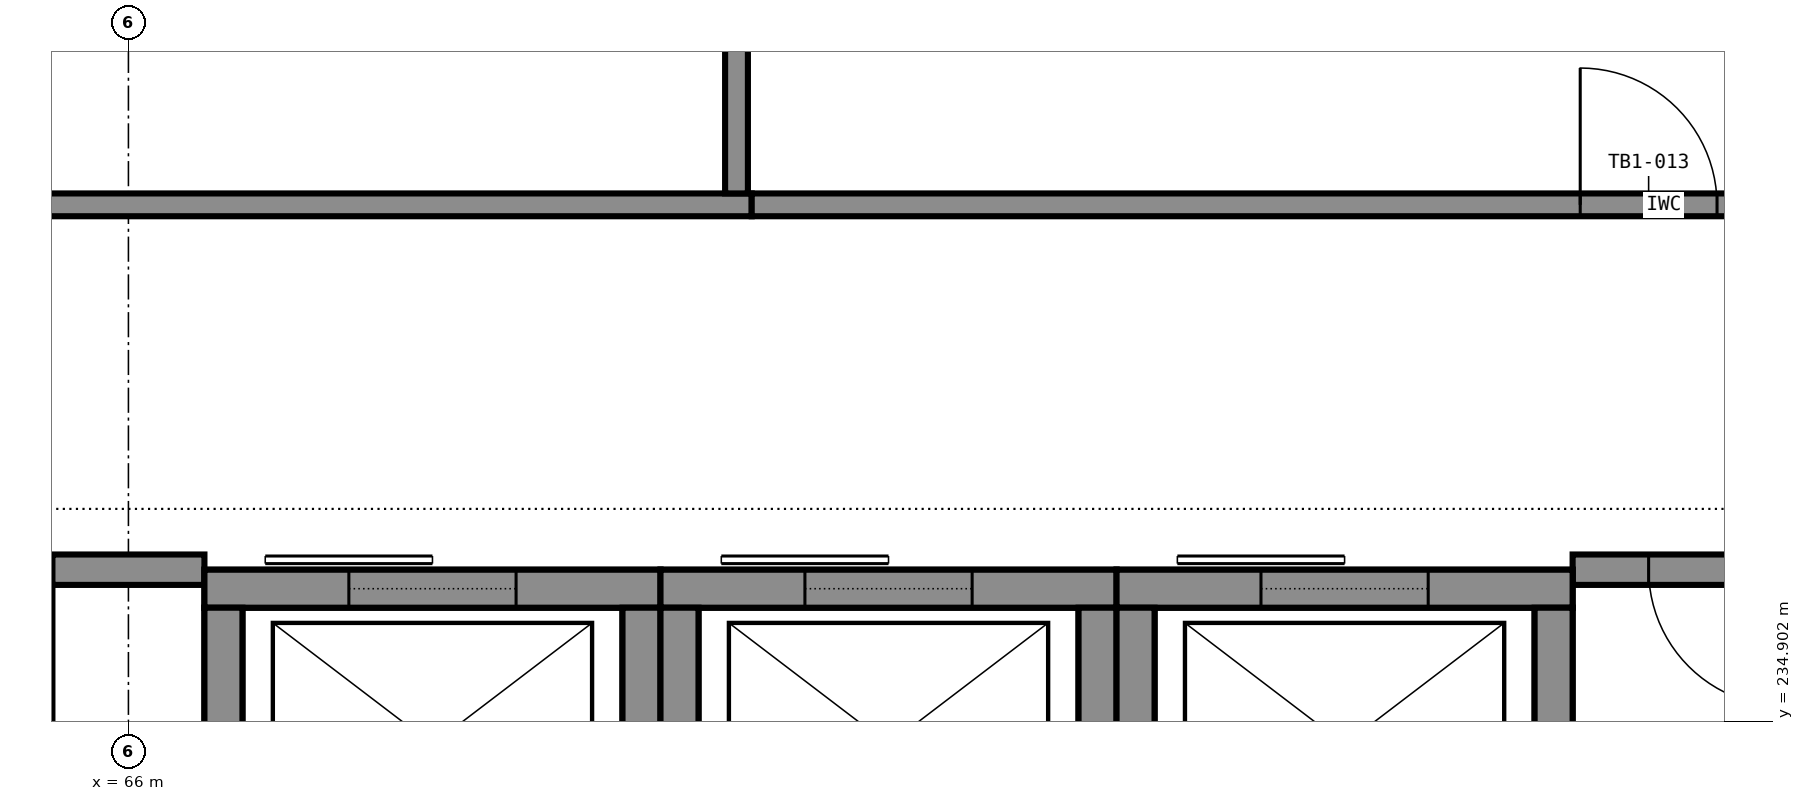
"""IFC4 building model, lengths in metres.
Left out: names, types, materials, properties, quantities, classifications, styles, units other than length and angle.
Written with IfcOpenShell. Run it as: python <this file> out.ifc"""

import sys

from ifc_helpers import new_model, si_unit, direction, frame, frame_2d, origin, place, context, subcontext, project, spatial, rectangle, extrude, element, fill, save


model = new_model("IFC4")
c1 = context("Model", 3, precision=1e-05, world=origin(), true_north=direction((0.0, 1.0)))
c2 = subcontext(c1, "Body", "Model", "MODEL_VIEW")
j1 = project(units=[si_unit("LENGTHUNIT", "METRE"), si_unit("PLANEANGLEUNIT", "RADIAN")], contexts=[c1])
p1 = place(None, origin())
s1 = spatial("IfcSite", under=j1, at=p1, CompositionType="ELEMENT")
p2 = place(p1, origin())
s2 = spatial("IfcBuilding", under=s1, at=p2, CompositionType="ELEMENT")
p3 = place(p2, frame((0.0, 0.0, -6.0)))
s3 = spatial("IfcBuildingStorey", under=s2, at=p3, CompositionType="ELEMENT", Elevation=-6.0)
p4 = place(p3, frame((66.5, 235.775, 0.0), z_axis=(0.0, 0.0, 1.0), x_axis=(1.0, 0.0, 0.0)))
e1 = element("IfcWall", 1, at=p4, inside=s3, PredefinedType="SHEAR", context=c2, shape_type="SweptSolid", body=[
    extrude(rectangle(XDim=3.0, YDim=0.25, at=frame_2d((1.5, 0.0))), origin(), (0.0, 0.0, 1.0), 6.0),
])
p5 = place(p4, frame((0.95, 0.0, 0.0)))
e2 = element("IfcOpeningElement", 2, at=p5, cuts=e1, PredefinedType="OPENING", context=c2, shape_type="SweptSolid", body=[
    extrude(rectangle(XDim=1.1, YDim=2.1, at=frame_2d((0.55, 1.05))), frame((0.0, 0.135, 0.0), z_axis=(0.0, -1.0, 0.0), x_axis=(1.0, 0.0, 0.0)), (0.0, 0.0, 1.0), 0.27),
])
for number, where, z_axis, x_axis in (
    (3, (66.625, 232.35, 0.0), (0.0, 0.0, 1.0), (0.0, 1.0, 0.0)),
    (4, (69.375, 232.35, 0.0), (0.0, 0.0, 1.0), (0.0, 1.0, 0.0)),
):
    element("IfcWall", number, at=place(p3, frame(where, z_axis=z_axis, x_axis=x_axis)), inside=s3, PredefinedType="SHEAR", context=c2, shape_type="SweptSolid", body=[
        extrude(rectangle(XDim=3.3, YDim=0.25, at=frame_2d((1.65, 0.0))), origin(), (0.0, 0.0, 1.0), 6.0),
    ])
p6 = place(p3, frame((69.5, 235.775, 0.0), z_axis=(0.0, 0.0, 1.0), x_axis=(1.0, 0.0, 0.0)))
e5 = element("IfcWall", 5, at=p6, inside=s3, PredefinedType="SHEAR", context=c2, shape_type="SweptSolid", body=[
    extrude(rectangle(XDim=3.0, YDim=0.25, at=frame_2d((1.5, 0.0))), origin(), (0.0, 0.0, 1.0), 6.0),
])
p7 = place(p6, frame((0.95, 0.0, 0.0)))
e6 = element("IfcOpeningElement", 6, at=p7, cuts=e5, PredefinedType="OPENING", context=c2, shape_type="SweptSolid", body=[
    extrude(rectangle(XDim=1.1, YDim=2.1, at=frame_2d((0.55, 1.05))), frame((0.0, 0.135, 0.0), z_axis=(0.0, -1.0, 0.0), x_axis=(1.0, 0.0, 0.0)), (0.0, 0.0, 1.0), 0.27),
])
for number, where, z_axis, x_axis in (
    (7, (69.625, 232.35, 0.0), (0.0, 0.0, 1.0), (0.0, 1.0, 0.0)),
    (8, (72.375, 232.35, 0.0), (0.0, 0.0, 1.0), (0.0, 1.0, 0.0)),
):
    element("IfcWall", number, at=place(p3, frame(where, z_axis=z_axis, x_axis=x_axis)), inside=s3, PredefinedType="SHEAR", context=c2, shape_type="SweptSolid", body=[
        extrude(rectangle(XDim=3.3, YDim=0.25, at=frame_2d((1.65, 0.0))), origin(), (0.0, 0.0, 1.0), 6.0),
    ])
p8 = place(p3, frame((72.5, 235.775, 0.0), z_axis=(0.0, 0.0, 1.0), x_axis=(1.0, 0.0, 0.0)))
e9 = element("IfcWall", 9, at=p8, inside=s3, PredefinedType="SHEAR", context=c2, shape_type="SweptSolid", body=[
    extrude(rectangle(XDim=3.0, YDim=0.25, at=frame_2d((1.5, 0.0))), origin(), (0.0, 0.0, 1.0), 6.0),
])
p9 = place(p8, frame((0.95, 0.0, 0.0)))
e10 = element("IfcOpeningElement", 10, at=p9, cuts=e9, PredefinedType="OPENING", context=c2, shape_type="SweptSolid", body=[
    extrude(rectangle(XDim=1.1, YDim=2.1, at=frame_2d((0.55, 1.05))), frame((0.0, 0.135, 0.0), z_axis=(0.0, -1.0, 0.0), x_axis=(1.0, 0.0, 0.0)), (0.0, 0.0, 1.0), 0.27),
])
for number, where, z_axis, x_axis in (
    (11, (72.625, 232.35, 0.0), (0.0, 0.0, 1.0), (0.0, 1.0, 0.0)),
    (12, (75.375, 232.35, 0.0), (0.0, 0.0, 1.0), (0.0, 1.0, 0.0)),
):
    element("IfcWall", number, at=place(p3, frame(where, z_axis=z_axis, x_axis=x_axis)), inside=s3, PredefinedType="SHEAR", context=c2, shape_type="SweptSolid", body=[
        extrude(rectangle(XDim=3.3, YDim=0.25, at=frame_2d((1.65, 0.0))), origin(), (0.0, 0.0, 1.0), 6.0),
    ])
p10 = place(p3, frame((65.5, 235.9, 0.0), z_axis=(0.0, 0.0, 1.0), x_axis=(1.0, 0.0, 0.0)))
e13 = element("IfcWall", 13, at=p10, inside=s3, PredefinedType="PARTITIONING", context=c2, shape_type="SweptSolid", body=[
    extrude(rectangle(XDim=1.0, YDim=0.2, at=frame_2d((0.5, 0.0))), origin(), (0.0, 0.0, 1.0), 5.7),
])
p11 = place(p3, frame((77.4, 235.9, 0.0), z_axis=(0.0, 0.0, 1.0), x_axis=(-1.0, 0.0, 0.0)))
e14 = element("IfcWall", 14, at=p11, inside=s3, PredefinedType="PARTITIONING", context=c2, shape_type="SweptSolid", body=[
    extrude(rectangle(XDim=1.9, YDim=0.2, at=frame_2d((0.95, 0.0))), origin(), (0.0, 0.0, 1.0), 5.7),
])
p12 = place(p11, frame((0.5, 0.0, 0.0)))
e15 = element("IfcOpeningElement", 15, at=p12, cuts=e14, PredefinedType="OPENING", context=c2, shape_type="SweptSolid", body=[
    extrude(rectangle(XDim=0.9, YDim=2.1, at=frame_2d((0.45, 1.05))), frame((0.0, 0.11, 0.0), z_axis=(0.0, -1.0, 0.0), x_axis=(1.0, 0.0, 0.0)), (0.0, 0.0, 1.0), 0.22),
])
p13 = place(p3, frame((58.1, 238.3, 0.0), z_axis=(0.0, 0.0, 1.0), x_axis=(1.0, 0.0, 0.0)))
e16 = element("IfcWall", 16, at=p13, inside=s3, PredefinedType="PARTITIONING", context=c2, shape_type="SweptSolid", body=[
    extrude(rectangle(XDim=12.0, YDim=0.15, at=frame_2d((6.0, 0.0))), origin(), (0.0, 0.0, 1.0), 5.7),
])
p14 = place(p13, frame((5.45, 0.0, 0.0)))
e17 = element("IfcOpeningElement", 17, at=p14, cuts=e16, PredefinedType="OPENING", context=c2, shape_type="SweptSolid", body=[
    extrude(rectangle(XDim=0.9, YDim=2.1, at=frame_2d((0.45, 1.05))), frame((0.0, 0.085, 0.0), z_axis=(0.0, -1.0, 0.0), x_axis=(1.0, 0.0, 0.0)), (0.0, 0.0, 1.0), 0.17),
])
p15 = place(p3, frame((70.1, 238.3, 0.0), z_axis=(0.0, 0.0, 1.0), x_axis=(1.0, 0.0, 0.0)))
e18 = element("IfcWall", 18, at=p15, inside=s3, PredefinedType="PARTITIONING", context=c2, shape_type="SweptSolid", body=[
    extrude(rectangle(XDim=12.0, YDim=0.15, at=frame_2d((6.0, 0.0))), origin(), (0.0, 0.0, 1.0), 5.7),
])
p16 = place(p15, frame((5.45, 0.0, 0.0)))
e19 = element("IfcOpeningElement", 19, at=p16, cuts=e18, PredefinedType="OPENING", context=c2, shape_type="SweptSolid", body=[
    extrude(rectangle(XDim=0.9, YDim=2.1, at=frame_2d((0.45, 1.05))), frame((0.0, 0.085, 0.0), z_axis=(0.0, -1.0, 0.0), x_axis=(1.0, 0.0, 0.0)), (0.0, 0.0, 1.0), 0.17),
])
p17 = place(p3, frame((70.0, 245.6, 0.0), z_axis=(0.0, 0.0, 1.0), x_axis=(0.0, -1.0, 0.0)))
e20 = element("IfcWall", 20, at=p17, inside=s3, PredefinedType="PARTITIONING", context=c2, shape_type="SweptSolid", body=[
    extrude(rectangle(XDim=7.225, YDim=0.15, at=frame_2d((3.613, 0.0))), origin(), (0.0, 0.0, 1.0), 5.7),
])
p18 = place(p3, frame((66.5, 235.775, -1.6), z_axis=(0.0, 0.0, 1.0), x_axis=(1.0, 0.0, 0.0)))
e21 = element("IfcWall", 21, at=p18, inside=s3, PredefinedType="SOLIDWALL", context=c2, shape_type="SweptSolid", body=[
    extrude(rectangle(XDim=3.0, YDim=0.25, at=frame_2d((1.5, 0.0))), origin(), (0.0, 0.0, 1.0), 1.6),
])
for number, where, z_axis, x_axis in (
    (22, (66.625, 232.35, -1.6), (0.0, 0.0, 1.0), (0.0, 1.0, 0.0)),
    (23, (69.375, 232.35, -1.6), (0.0, 0.0, 1.0), (0.0, 1.0, 0.0)),
):
    element("IfcWall", number, at=place(p3, frame(where, z_axis=z_axis, x_axis=x_axis)), inside=s3, PredefinedType="SOLIDWALL", context=c2, shape_type="SweptSolid", body=[
        extrude(rectangle(XDim=3.3, YDim=0.25, at=frame_2d((1.65, 0.0))), origin(), (0.0, 0.0, 1.0), 1.6),
    ])
p19 = place(p3, frame((69.5, 235.775, -1.6), z_axis=(0.0, 0.0, 1.0), x_axis=(1.0, 0.0, 0.0)))
e24 = element("IfcWall", 24, at=p19, inside=s3, PredefinedType="SOLIDWALL", context=c2, shape_type="SweptSolid", body=[
    extrude(rectangle(XDim=3.0, YDim=0.25, at=frame_2d((1.5, 0.0))), origin(), (0.0, 0.0, 1.0), 1.6),
])
for number, where, z_axis, x_axis in (
    (25, (69.625, 232.35, -1.6), (0.0, 0.0, 1.0), (0.0, 1.0, 0.0)),
    (26, (72.375, 232.35, -1.6), (0.0, 0.0, 1.0), (0.0, 1.0, 0.0)),
):
    element("IfcWall", number, at=place(p3, frame(where, z_axis=z_axis, x_axis=x_axis)), inside=s3, PredefinedType="SOLIDWALL", context=c2, shape_type="SweptSolid", body=[
        extrude(rectangle(XDim=3.3, YDim=0.25, at=frame_2d((1.65, 0.0))), origin(), (0.0, 0.0, 1.0), 1.6),
    ])
p20 = place(p3, frame((72.5, 235.775, -1.6), z_axis=(0.0, 0.0, 1.0), x_axis=(1.0, 0.0, 0.0)))
e27 = element("IfcWall", 27, at=p20, inside=s3, PredefinedType="SOLIDWALL", context=c2, shape_type="SweptSolid", body=[
    extrude(rectangle(XDim=3.0, YDim=0.25, at=frame_2d((1.5, 0.0))), origin(), (0.0, 0.0, 1.0), 1.6),
])
for number, where, z_axis, x_axis in (
    (28, (72.625, 232.35, -1.6), (0.0, 0.0, 1.0), (0.0, 1.0, 0.0)),
    (29, (75.375, 232.35, -1.6), (0.0, 0.0, 1.0), (0.0, 1.0, 0.0)),
):
    element("IfcWall", number, at=place(p3, frame(where, z_axis=z_axis, x_axis=x_axis)), inside=s3, PredefinedType="SOLIDWALL", context=c2, shape_type="SweptSolid", body=[
        extrude(rectangle(XDim=3.3, YDim=0.25, at=frame_2d((1.65, 0.0))), origin(), (0.0, 0.0, 1.0), 1.6),
    ])
p21 = place(p12, origin())
e30 = element("IfcDoor", 30, at=p21, inside=s3, OperationType="SINGLE_SWING_LEFT", PredefinedType="DOOR", context=c2, shape_type="SweptSolid", body=[
    extrude(rectangle(XDim=0.9, YDim=2.1, at=frame_2d((0.45, 1.05))), frame((0.0, 0.025, 0.0), z_axis=(0.0, -1.0, 0.0), x_axis=(1.0, 0.0, 0.0)), (0.0, 0.0, 1.0), 0.05),
])
fill(e15, e30)
p22 = place(p16, origin())
e31 = element("IfcDoor", 31, at=p22, inside=s3, OperationType="SINGLE_SWING_LEFT", PredefinedType="DOOR", context=c2, shape_type="SweptSolid", body=[
    extrude(rectangle(XDim=0.9, YDim=2.1, at=frame_2d((0.45, 1.05))), frame((0.0, 0.025, 0.0), z_axis=(0.0, -1.0, 0.0), x_axis=(1.0, 0.0, 0.0)), (0.0, 0.0, 1.0), 0.05),
])
fill(e19, e31)
p23 = place(p5, origin())
e32 = element("IfcDoor", 32, at=p23, inside=s3, OperationType="SLIDING_TO_LEFT", PredefinedType="DOOR", context=c2, shape_type="SweptSolid", body=[
    extrude(rectangle(XDim=1.1, YDim=2.1, at=frame_2d((0.55, 1.05))), frame((0.0, 0.025, 0.0), z_axis=(0.0, -1.0, 0.0), x_axis=(1.0, 0.0, 0.0)), (0.0, 0.0, 1.0), 0.05),
])
fill(e2, e32)
p24 = place(p7, origin())
e33 = element("IfcDoor", 33, at=p24, inside=s3, OperationType="SLIDING_TO_LEFT", PredefinedType="DOOR", context=c2, shape_type="SweptSolid", body=[
    extrude(rectangle(XDim=1.1, YDim=2.1, at=frame_2d((0.55, 1.05))), frame((0.0, 0.025, 0.0), z_axis=(0.0, -1.0, 0.0), x_axis=(1.0, 0.0, 0.0)), (0.0, 0.0, 1.0), 0.05),
])
fill(e6, e33)
p25 = place(p9, origin())
e34 = element("IfcDoor", 34, at=p25, inside=s3, OperationType="SLIDING_TO_LEFT", PredefinedType="DOOR", context=c2, shape_type="SweptSolid", body=[
    extrude(rectangle(XDim=1.1, YDim=2.1, at=frame_2d((0.55, 1.05))), frame((0.0, 0.025, 0.0), z_axis=(0.0, -1.0, 0.0), x_axis=(1.0, 0.0, 0.0)), (0.0, 0.0, 1.0), 0.05),
])
fill(e10, e34)
save(model, sys.argv[1])
